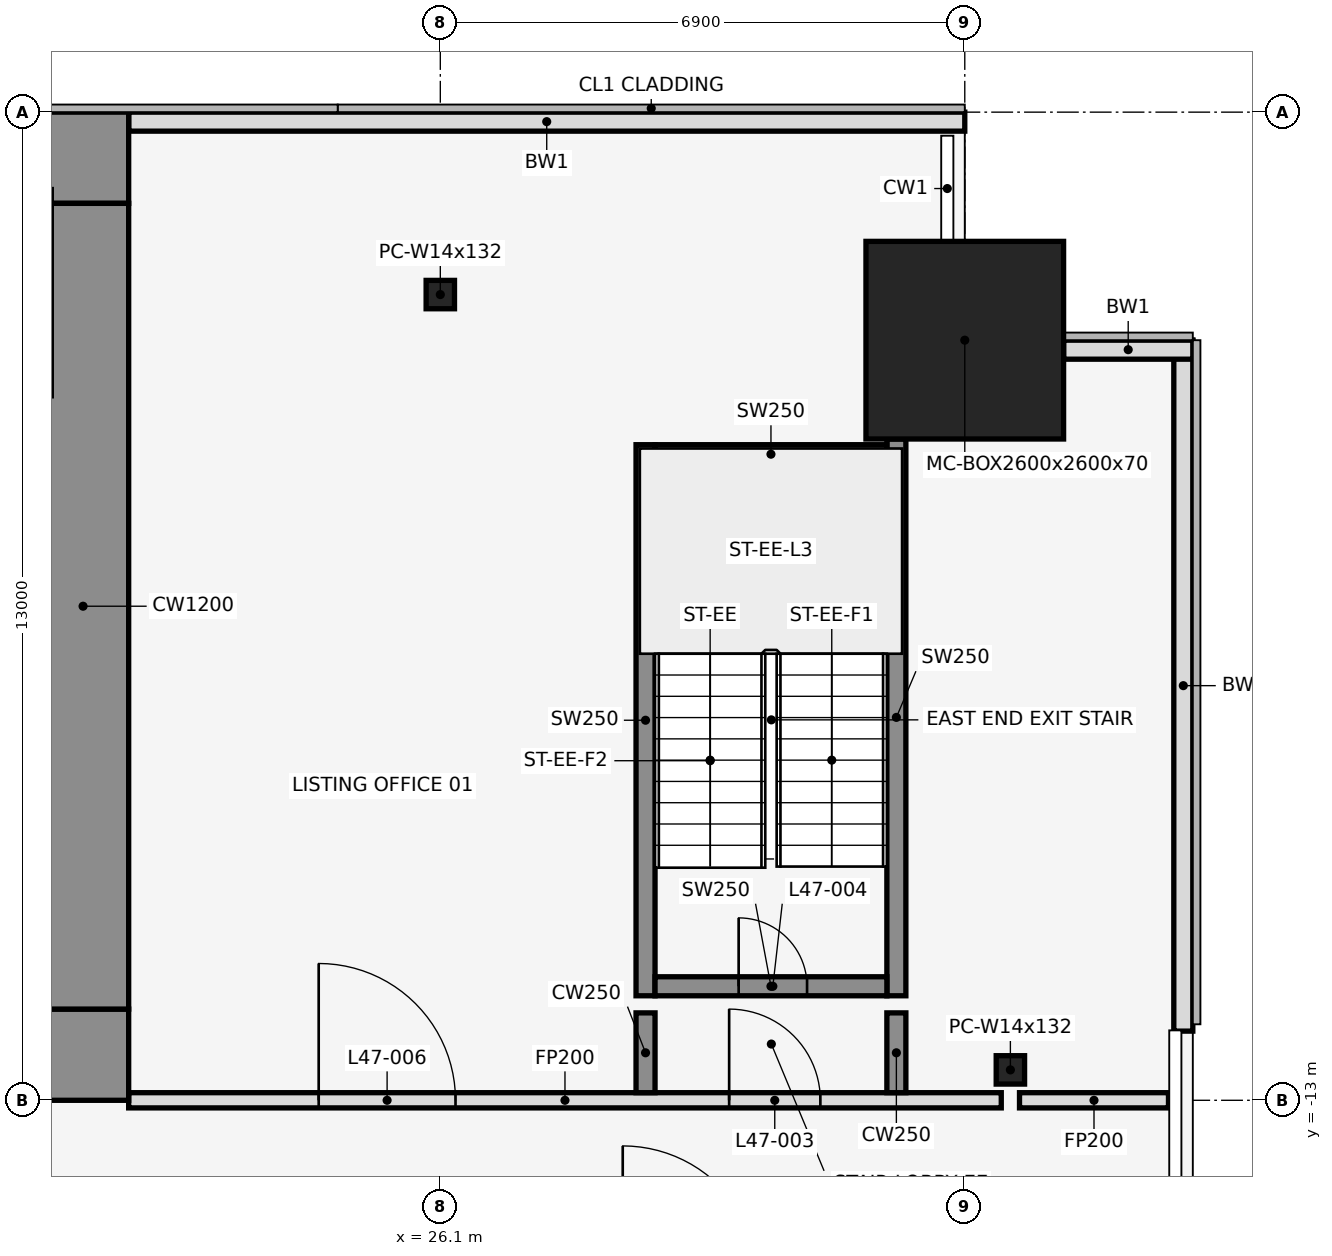
"""IFC4 building model, lengths in metres.
Left out: names, types, materials, properties, quantities, classifications, styles, units other than length and angle.
Written with IfcOpenShell. Run it as: python <this file> out.ifc"""

import sys

from ifc_helpers import new_model, si_unit, direction, frame, frame_2d, origin, origin_2d, place, context, subcontext, project, spatial, rectangle, hollow_rectangle, i_section, extrude, element, fill, save


model = new_model("IFC4")
c1 = context("Model", 3, precision=1e-05, world=origin(), true_north=direction((0.0, 1.0)))
c2 = subcontext(c1, "Body", "Model", "MODEL_VIEW")
j1 = project(units=[si_unit("LENGTHUNIT", "METRE"), si_unit("PLANEANGLEUNIT", "RADIAN")], contexts=[c1])
p1 = place(None, origin())
s1 = spatial("IfcSite", under=j1, at=p1, CompositionType="ELEMENT")
p2 = place(p1, origin())
s2 = spatial("IfcBuilding", under=s1, at=p2, CompositionType="ELEMENT")
p3 = place(p2, frame((0.0, 0.0, 211.4)))
s3 = spatial("IfcBuildingStorey", under=s2, at=p3, CompositionType="ELEMENT", Elevation=211.4)
p4 = place(p3, frame((26.1, -2.4, 0.0), z_axis=(0.0, 0.0, 1.0), x_axis=(1.0, 0.0, 0.0)))
e1 = element("IfcColumn", 1, at=p4, inside=s3, PredefinedType="COLUMN", context=c2, shape_type="SweptSolid", body=[
    extrude(i_section(OverallWidth=0.373, OverallDepth=0.373, WebThickness=0.016, FlangeThickness=0.026, at=origin_2d()), origin(), (0.0, 0.0, 1.0), 4.1),
])
p5 = place(p3, frame((33.0, -3.0, 0.0), z_axis=(0.0, 0.0, 1.0), x_axis=(1.0, 0.0, 0.0)))
e2 = element("IfcColumn", 2, at=p5, inside=s3, PredefinedType="COLUMN", context=c2, shape_type="SweptSolid", body=[
    extrude(hollow_rectangle(XDim=2.6, YDim=2.6, WallThickness=0.07, at=origin_2d()), origin(), (0.0, 0.0, 1.0), 4.1),
])
p6 = place(p3, frame((33.6, -12.6, 0.0), z_axis=(0.0, 0.0, 1.0), x_axis=(1.0, 0.0, 0.0)))
e3 = element("IfcColumn", 3, at=p6, inside=s3, PredefinedType="COLUMN", context=c2, shape_type="SweptSolid", body=[
    extrude(i_section(OverallWidth=0.373, OverallDepth=0.373, WebThickness=0.016, FlangeThickness=0.026, at=origin_2d()), origin(), (0.0, 0.0, 1.0), 4.1),
])
p7 = place(p3, frame((33.0, -0.125, 0.0), z_axis=(0.0, 0.0, 1.0), x_axis=(-1.0, 0.0, 0.0)))
e4 = element("IfcWall", 4, at=p7, inside=s3, PredefinedType="STANDARD", context=c2, shape_type="SweptSolid", body=[
    extrude(rectangle(XDim=11.0, YDim=0.25, at=frame_2d((5.5, 0.0))), origin(), (0.0, 0.0, 1.0), 3.95),
])
p8 = place(p3, frame((35.875, -12.09, 0.0), z_axis=(0.0, 0.0, 1.0), x_axis=(0.0, 1.0, 0.0)))
e5 = element("IfcWall", 5, at=p8, inside=s3, PredefinedType="STANDARD", context=c2, shape_type="SweptSolid", body=[
    extrude(rectangle(XDim=9.09, YDim=0.25, at=frame_2d((4.545, 0.0))), origin(), (0.0, 0.0, 1.0), 3.95),
])
p9 = place(p3, frame((36.0, -3.125, 0.0), z_axis=(0.0, 0.0, 1.0), x_axis=(-1.0, 0.0, 0.0)))
e6 = element("IfcWall", 6, at=p9, inside=s3, PredefinedType="STANDARD", context=c2, shape_type="SweptSolid", body=[
    extrude(rectangle(XDim=1.7, YDim=0.25, at=frame_2d((0.85, 0.0))), origin(), (0.0, 0.0, 1.0), 3.95),
])
p10 = place(p3, frame((28.8, -11.625, 0.0), z_axis=(0.0, 0.0, 1.0), x_axis=(0.0, 1.0, 0.0)))
e7 = element("IfcWall", 7, at=p10, inside=s3, PredefinedType="SHEAR", context=c2, shape_type="SweptSolid", body=[
    extrude(rectangle(XDim=7.25, YDim=0.25, at=frame_2d((3.625, 0.0))), origin(), (0.0, 0.0, 1.0), 4.1),
])
p11 = place(p3, frame((32.1, -11.625, 0.0), z_axis=(0.0, 0.0, 1.0), x_axis=(0.0, 1.0, 0.0)))
e8 = element("IfcWall", 8, at=p11, inside=s3, PredefinedType="SHEAR", context=c2, shape_type="SweptSolid", body=[
    extrude(rectangle(XDim=7.325, YDim=0.25, at=frame_2d((3.663, 0.0))), origin(), (0.0, 0.0, 1.0), 4.1),
])
p12 = place(p3, frame((28.925, -11.5, 0.0), z_axis=(0.0, 0.0, 1.0), x_axis=(1.0, 0.0, 0.0)))
e9 = element("IfcWall", 9, at=p12, inside=s3, PredefinedType="SHEAR", context=c2, shape_type="SweptSolid", body=[
    extrude(rectangle(XDim=3.05, YDim=0.25, at=frame_2d((1.525, 0.0))), origin(), (0.0, 0.0, 1.0), 4.1),
])
p13 = place(p12, frame((1.1, 0.0, 0.0)))
e10 = element("IfcOpeningElement", 10, at=p13, cuts=e9, PredefinedType="OPENING", context=c2, shape_type="SweptSolid", body=[
    extrude(rectangle(XDim=0.9, YDim=2.1, at=frame_2d((0.45, 1.05))), frame((0.0, 0.137, 0.0), z_axis=(0.0, -1.0, 0.0), x_axis=(1.0, 0.0, 0.0)), (0.0, 0.0, 1.0), 0.274),
])
p14 = place(p3, frame((28.925, -4.5, 0.0), z_axis=(0.0, 0.0, 1.0), x_axis=(1.0, 0.0, 0.0)))
e11 = element("IfcWall", 11, at=p14, inside=s3, PredefinedType="SHEAR", context=c2, shape_type="SweptSolid", body=[
    extrude(rectangle(XDim=3.05, YDim=0.25, at=frame_2d((1.525, 0.0))), origin(), (0.0, 0.0, 1.0), 4.1),
])
p15 = place(p3, frame((22.0, -13.0, 0.0), z_axis=(0.0, 0.0, 1.0), x_axis=(1.0, 0.0, 0.0)))
e12 = element("IfcWall", 12, at=p15, inside=s3, PredefinedType="PARTITIONING", context=c2, shape_type="SweptSolid", body=[
    extrude(rectangle(XDim=11.48, YDim=0.2, at=frame_2d((5.74, 0.0))), origin(), (0.0, 0.0, 1.0), 2.841),
])
p16 = place(p15, frame((7.9, 0.0, 0.0)))
e13 = element("IfcOpeningElement", 13, at=p16, cuts=e12, PredefinedType="OPENING", context=c2, shape_type="SweptSolid", body=[
    extrude(rectangle(XDim=1.2, YDim=2.1, at=frame_2d((0.6, 1.05))), frame((0.0, 0.112, 0.0), z_axis=(0.0, -1.0, 0.0), x_axis=(1.0, 0.0, 0.0)), (0.0, 0.0, 1.0), 0.224),
])
p17 = place(p15, frame((2.5, 0.0, 0.0)))
e14 = element("IfcOpeningElement", 14, at=p17, cuts=e12, PredefinedType="OPENING", context=c2, shape_type="SweptSolid", body=[
    extrude(rectangle(XDim=1.8, YDim=2.1, at=frame_2d((0.9, 1.05))), frame((0.0, 0.112, 0.0), z_axis=(0.0, -1.0, 0.0), x_axis=(1.0, 0.0, 0.0)), (0.0, 0.0, 1.0), 0.224),
])
p18 = place(p3, frame((33.72, -13.0, 0.0), z_axis=(0.0, 0.0, 1.0), x_axis=(1.0, 0.0, 0.0)))
e15 = element("IfcWall", 15, at=p18, inside=s3, PredefinedType="PARTITIONING", context=c2, shape_type="SweptSolid", body=[
    extrude(rectangle(XDim=1.96, YDim=0.2, at=frame_2d((0.98, 0.0))), origin(), (0.0, 0.0, 1.0), 2.841),
])
for number, where, z_axis, x_axis in (
    (16, (28.8, -12.9, 0.0), (0.0, 0.0, 1.0), (0.0, 1.0, 0.0)),
    (17, (32.1, -12.9, 0.0), (0.0, 0.0, 1.0), (0.0, 1.0, 0.0)),
):
    element("IfcWall", number, at=place(p3, frame(where, z_axis=z_axis, x_axis=x_axis)), inside=s3, PredefinedType="SHEAR", context=c2, shape_type="SweptSolid", body=[
        extrude(rectangle(XDim=1.05, YDim=0.25, at=frame_2d((0.525, 0.0))), origin(), (0.0, 0.0, 1.0), 4.1),
    ])
p19 = place(p3, frame((-22.0, -0.6, 0.0), z_axis=(0.0, 0.0, 1.0), x_axis=(1.0, 0.0, 0.0)))
e18 = element("IfcWall", 18, at=p19, inside=s3, PredefinedType="SHEAR", context=c2, shape_type="SweptSolid", body=[
    extrude(rectangle(XDim=44.0, YDim=1.2, at=frame_2d((22.0, 0.0))), origin(), (0.0, 0.0, 1.0), 4.1),
])
p20 = place(p19, frame((18.55, 0.0, 0.0)))
e19 = element("IfcOpeningElement", 19, at=p20, cuts=e18, PredefinedType="OPENING", context=c2, shape_type="SweptSolid", body=[
    extrude(rectangle(XDim=0.9, YDim=2.1, at=frame_2d((0.45, 1.05))), frame((0.0, 0.612, 0.0), z_axis=(0.0, -1.0, 0.0), x_axis=(1.0, 0.0, 0.0)), (0.0, 0.0, 1.0), 1.224),
])
p21 = place(p19, frame((24.55, 0.0, 0.0)))
e20 = element("IfcOpeningElement", 20, at=p21, cuts=e18, PredefinedType="OPENING", context=c2, shape_type="SweptSolid", body=[
    extrude(rectangle(XDim=0.9, YDim=2.1, at=frame_2d((0.45, 1.05))), frame((0.0, 0.612, 0.0), z_axis=(0.0, -1.0, 0.0), x_axis=(1.0, 0.0, 0.0)), (0.0, 0.0, 1.0), 1.224),
])
p22 = place(p3, frame((-22.0, -12.4, 0.0), z_axis=(0.0, 0.0, 1.0), x_axis=(1.0, 0.0, 0.0)))
e21 = element("IfcWall", 21, at=p22, inside=s3, PredefinedType="SHEAR", context=c2, shape_type="SweptSolid", body=[
    extrude(rectangle(XDim=44.0, YDim=1.2, at=frame_2d((22.0, 0.0))), origin(), (0.0, 0.0, 1.0), 4.1),
])
p23 = place(p22, frame((2.2, 0.0, 0.0)))
e22 = element("IfcOpeningElement", 22, at=p23, cuts=e21, PredefinedType="OPENING", context=c2, shape_type="SweptSolid", body=[
    extrude(rectangle(XDim=1.2, YDim=2.1, at=frame_2d((0.6, 1.05))), frame((0.0, 0.612, 0.0), z_axis=(0.0, -1.0, 0.0), x_axis=(1.0, 0.0, 0.0)), (0.0, 0.0, 1.0), 1.224),
])
p24 = place(p22, frame((21.4, 0.0, 0.0)))
e23 = element("IfcOpeningElement", 23, at=p24, cuts=e21, PredefinedType="OPENING", context=c2, shape_type="SweptSolid", body=[
    extrude(rectangle(XDim=1.2, YDim=2.1, at=frame_2d((0.6, 1.05))), frame((0.0, 0.612, 0.0), z_axis=(0.0, -1.0, 0.0), x_axis=(1.0, 0.0, 0.0)), (0.0, 0.0, 1.0), 1.224),
])
p25 = place(p22, frame((40.6, 0.0, 0.0)))
e24 = element("IfcOpeningElement", 24, at=p25, cuts=e21, PredefinedType="OPENING", context=c2, shape_type="SweptSolid", body=[
    extrude(rectangle(XDim=1.2, YDim=2.1, at=frame_2d((0.6, 1.05))), frame((0.0, 0.612, 0.0), z_axis=(0.0, -1.0, 0.0), x_axis=(1.0, 0.0, 0.0)), (0.0, 0.0, 1.0), 1.224),
])
p26 = place(p22, frame((16.0, 0.0, 0.0)))
e25 = element("IfcOpeningElement", 25, at=p26, cuts=e21, PredefinedType="OPENING", context=c2, shape_type="SweptSolid", body=[
    extrude(rectangle(XDim=1.8, YDim=2.1, at=frame_2d((0.9, 1.05))), frame((0.0, 0.612, 0.0), z_axis=(0.0, -1.0, 0.0), x_axis=(1.0, 0.0, 0.0)), (0.0, 0.0, 1.0), 1.224),
])
p27 = place(p22, frame((6.3, 0.0, 0.0)))
e26 = element("IfcOpeningElement", 26, at=p27, cuts=e21, PredefinedType="OPENING", context=c2, shape_type="SweptSolid", body=[
    extrude(rectangle(XDim=1.2, YDim=2.1, at=frame_2d((0.6, 1.05))), frame((0.0, 0.612, 0.0), z_axis=(0.0, -1.0, 0.0), x_axis=(1.0, 0.0, 0.0)), (0.0, 0.0, 1.0), 1.224),
])
p28 = place(p22, frame((26.2, 0.0, 0.0)))
e27 = element("IfcOpeningElement", 27, at=p28, cuts=e21, PredefinedType="OPENING", context=c2, shape_type="SweptSolid", body=[
    extrude(rectangle(XDim=1.8, YDim=2.1, at=frame_2d((0.9, 1.05))), frame((0.0, 0.612, 0.0), z_axis=(0.0, -1.0, 0.0), x_axis=(1.0, 0.0, 0.0)), (0.0, 0.0, 1.0), 1.224),
])
p29 = place(p22, frame((36.5, 0.0, 0.0)))
e28 = element("IfcOpeningElement", 28, at=p29, cuts=e21, PredefinedType="OPENING", context=c2, shape_type="SweptSolid", body=[
    extrude(rectangle(XDim=1.2, YDim=2.1, at=frame_2d((0.6, 1.05))), frame((0.0, 0.612, 0.0), z_axis=(0.0, -1.0, 0.0), x_axis=(1.0, 0.0, 0.0)), (0.0, 0.0, 1.0), 1.224),
])
p30 = place(p3, frame((21.4, -11.8, 0.0), z_axis=(0.0, 0.0, 1.0), x_axis=(0.0, 1.0, 0.0)))
e29 = element("IfcWall", 29, at=p30, inside=s3, PredefinedType="SHEAR", context=c2, shape_type="SweptSolid", body=[
    extrude(rectangle(XDim=10.6, YDim=1.2, at=frame_2d((5.3, 0.0))), origin(), (0.0, 0.0, 1.0), 4.1),
])
p31 = place(p16, origin())
e30 = element("IfcDoor", 30, at=p31, inside=s3, OperationType="SINGLE_SWING_RIGHT", PredefinedType="DOOR", context=c2, shape_type="SweptSolid", body=[
    extrude(rectangle(XDim=1.2, YDim=2.1, at=frame_2d((0.6, 1.05))), frame((0.0, 0.025, 0.0), z_axis=(0.0, -1.0, 0.0), x_axis=(1.0, 0.0, 0.0)), (0.0, 0.0, 1.0), 0.05),
])
fill(e13, e30)
p32 = place(p13, origin())
e31 = element("IfcDoor", 31, at=p32, inside=s3, OperationType="SINGLE_SWING_LEFT", PredefinedType="DOOR", context=c2, shape_type="SweptSolid", body=[
    extrude(rectangle(XDim=0.9, YDim=2.1, at=frame_2d((0.45, 1.05))), frame((0.0, 0.025, 0.0), z_axis=(0.0, -1.0, 0.0), x_axis=(1.0, 0.0, 0.0)), (0.0, 0.0, 1.0), 0.05),
])
fill(e10, e31)
p33 = place(p17, origin())
e32 = element("IfcDoor", 32, at=p33, inside=s3, OperationType="SINGLE_SWING_LEFT", PredefinedType="DOOR", context=c2, shape_type="SweptSolid", body=[
    extrude(rectangle(XDim=1.8, YDim=2.1, at=frame_2d((0.9, 1.05))), frame((0.0, 0.025, 0.0), z_axis=(0.0, -1.0, 0.0), x_axis=(1.0, 0.0, 0.0)), (0.0, 0.0, 1.0), 0.05),
])
fill(e14, e32)
save(model, sys.argv[1])
